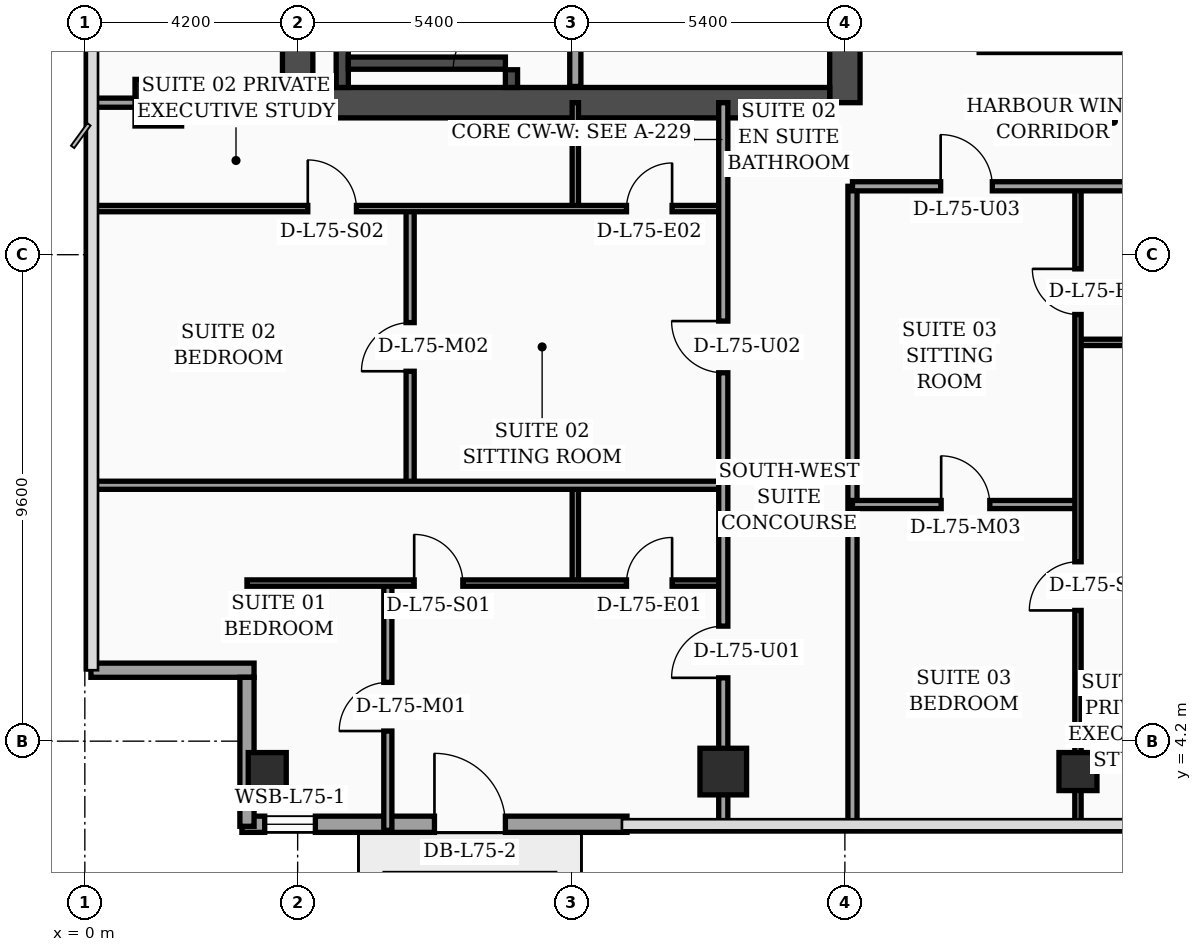
"""IFC4 building model, lengths in metres.
Left out: names, types, materials, properties, quantities, classifications, styles, units other than length and angle.
Written with IfcOpenShell. Run it as: python <this file> out.ifc"""

import sys

from ifc_helpers import new_model, si_unit, direction, frame, frame_2d, origin, origin_2d, place, context, subcontext, project, spatial, rectangle, hollow_rectangle, extrude, element, fill, save


model = new_model("IFC4")
c1 = context("Model", 3, precision=1e-05, world=origin(), true_north=direction((0.0, 1.0)))
c2 = subcontext(c1, "Body", "Model", "MODEL_VIEW")
j1 = project(units=[si_unit("LENGTHUNIT", "METRE"), si_unit("PLANEANGLEUNIT", "RADIAN")], contexts=[c1])
p1 = place(None, origin())
s1 = spatial("IfcSite", under=j1, at=p1, CompositionType="ELEMENT")
p2 = place(p1, origin())
s2 = spatial("IfcBuilding", under=s1, at=p2, CompositionType="ELEMENT")
p3 = place(p2, frame((0.0, 0.0, 302.5)))
s3 = spatial("IfcBuildingStorey", under=s2, at=p3, CompositionType="ELEMENT", Elevation=302.5)
p4 = place(p3, frame((4.2, 16.8, 0.0), z_axis=(0.0, 0.0, 1.0), x_axis=(0.0, 1.0, 0.0)))
e1 = element("IfcWall", 1, at=p4, inside=s3, PredefinedType="SHEAR", context=c2, shape_type="SweptSolid", body=[
    extrude(rectangle(XDim=21.6, YDim=0.6, at=frame_2d((10.8, 0.0))), origin(), (0.0, 0.0, 1.0), 4.05),
])
p5 = place(p3, frame((15.0, 16.8, 0.0), z_axis=(0.0, 0.0, 1.0), x_axis=(0.0, 1.0, 0.0)))
e2 = element("IfcWall", 2, at=p5, inside=s3, PredefinedType="SHEAR", context=c2, shape_type="SweptSolid", body=[
    extrude(rectangle(XDim=21.6, YDim=0.6, at=frame_2d((10.8, 0.0))), origin(), (0.0, 0.0, 1.0), 4.05),
])
p6 = place(p5, frame((8.65, 0.0, 0.0)))
e3 = element("IfcOpeningElement", 3, at=p6, cuts=e2, PredefinedType="OPENING", context=c2, shape_type="SweptSolid", body=[
    extrude(rectangle(XDim=1.1, YDim=2.2, at=frame_2d((0.55, 1.1))), frame((0.0, 0.31, 0.0), z_axis=(0.0, -1.0, 0.0), x_axis=(1.0, 0.0, 0.0)), (0.0, 0.0, 1.0), 0.62),
])
p7 = place(p5, frame((18.9, 0.0, 0.0)))
e4 = element("IfcOpeningElement", 4, at=p7, cuts=e2, PredefinedType="OPENING", context=c2, shape_type="SweptSolid", body=[
    extrude(rectangle(XDim=1.1, YDim=2.2, at=frame_2d((0.55, 1.1))), frame((0.0, 0.31, 0.0), z_axis=(0.0, -1.0, 0.0), x_axis=(1.0, 0.0, 0.0)), (0.0, 0.0, 1.0), 0.62),
])
p8 = place(p3, frame((4.5, 16.8, 0.0), z_axis=(0.0, 0.0, 1.0), x_axis=(1.0, 0.0, 0.0)))
e5 = element("IfcWall", 5, at=p8, inside=s3, PredefinedType="SHEAR", context=c2, shape_type="SweptSolid", body=[
    extrude(rectangle(XDim=10.2, YDim=0.6, at=frame_2d((5.1, 0.0))), origin(), (0.0, 0.0, 1.0), 4.05),
])
p9 = place(p3, frame((5.08, 17.1, 0.0), z_axis=(0.0, 0.0, 1.0), x_axis=(0.0, 1.0, 0.0)))
e6 = element("IfcWall", 6, at=p9, inside=s3, PredefinedType="SOLIDWALL", context=c2, shape_type="SweptSolid", body=[
    extrude(rectangle(XDim=9.69, YDim=0.24, at=frame_2d((4.845, 0.0))), origin(), (0.0, 0.0, 1.0), 4.05),
])
p10 = place(p3, frame((8.42, 17.1, 0.0), z_axis=(0.0, 0.0, 1.0), x_axis=(0.0, 1.0, 0.0)))
e7 = element("IfcWall", 7, at=p10, inside=s3, PredefinedType="SOLIDWALL", context=c2, shape_type="SweptSolid", body=[
    extrude(rectangle(XDim=9.69, YDim=0.24, at=frame_2d((4.845, 0.0))), origin(), (0.0, 0.0, 1.0), 4.05),
])
p11 = place(p10, frame((0.35, 0.0, 0.0)))
e8 = element("IfcOpeningElement", 8, at=p11, cuts=e7, PredefinedType="OPENING", context=c2, shape_type="SweptSolid", body=[
    extrude(rectangle(XDim=1.15, YDim=2.2, at=frame_2d((0.575, 1.1))), frame((0.0, 0.13, 0.0), z_axis=(0.0, -1.0, 0.0), x_axis=(1.0, 0.0, 0.0)), (0.0, 0.0, 1.0), 0.26),
])
p12 = place(p3, frame((5.2, 17.58, 0.0), z_axis=(0.0, 0.0, 1.0), x_axis=(1.0, 0.0, 0.0)))
e9 = element("IfcWall", 9, at=p12, inside=s3, PredefinedType="SOLIDWALL", context=c2, shape_type="SweptSolid", body=[
    extrude(rectangle(XDim=3.1, YDim=0.24, at=frame_2d((1.55, 0.0))), origin(), (0.0, 0.0, 1.0), 4.05),
])
p13 = place(p3, frame((3.6, 3.6, 0.0), z_axis=(0.0, 0.0, 1.0), x_axis=(1.0, 0.0, 0.0)))
e10 = element("IfcColumn", 10, at=p13, inside=s3, PredefinedType="COLUMN", context=c2, shape_type="SweptSolid", body=[
    extrude(hollow_rectangle(XDim=0.75, YDim=0.75, WallThickness=0.032, at=origin_2d()), origin(), (0.0, 0.0, 1.0), 4.05),
])
for number, where, z_axis, x_axis in (
    (11, (1.45, 16.8, 0.0), (0.0, 0.0, 1.0), (1.0, 0.0, 0.0)),
    (12, (12.6, 3.6, 0.0), (0.0, 0.0, 1.0), (1.0, 0.0, 0.0)),
):
    element("IfcColumn", number, at=place(p3, frame(where, z_axis=z_axis, x_axis=x_axis)), inside=s3, PredefinedType="COLUMN", context=c2, shape_type="SweptSolid", body=[
        extrude(rectangle(XDim=0.92, YDim=0.92, at=origin_2d()), origin(), (0.0, 0.0, 1.0), 4.05),
    ])
p14 = place(p3, frame((19.6, 3.6, 0.0), z_axis=(0.0, 0.0, 1.0), x_axis=(1.0, 0.0, 0.0)))
e13 = element("IfcColumn", 13, at=p14, inside=s3, PredefinedType="COLUMN", context=c2, shape_type="SweptSolid", body=[
    extrude(hollow_rectangle(XDim=0.75, YDim=0.75, WallThickness=0.032, at=origin_2d()), origin(), (0.0, 0.0, 1.0), 4.05),
])
p15 = place(p3, frame((3.1, 2.56, 0.0), z_axis=(0.0, 0.0, 1.0), x_axis=(1.0, 0.0, 0.0)))
e14 = element("IfcWall", 14, at=p15, inside=s3, PredefinedType="SOLIDWALL", context=c2, shape_type="SweptSolid", body=[
    extrude(rectangle(XDim=7.6, YDim=0.32, at=frame_2d((3.8, 0.0))), origin(), (0.0, 0.0, 1.0), 4.05),
])
p16 = place(p15, frame((0.45, 0.0, 0.75)))
e15 = element("IfcOpeningElement", 15, at=p16, cuts=e14, PredefinedType="OPENING", context=c2, shape_type="SweptSolid", body=[
    extrude(rectangle(XDim=1.0, YDim=1.6, at=frame_2d((0.5, 0.8))), frame((0.0, 0.17, 0.0), z_axis=(0.0, -1.0, 0.0), x_axis=(1.0, 0.0, 0.0)), (0.0, 0.0, 1.0), 0.34),
])
p17 = place(p15, frame((3.8, 0.0, 0.0)))
e16 = element("IfcOpeningElement", 16, at=p17, cuts=e14, PredefinedType="OPENING", context=c2, shape_type="SweptSolid", body=[
    extrude(rectangle(XDim=1.4, YDim=2.25, at=frame_2d((0.7, 1.125))), frame((0.0, 0.17, 0.0), z_axis=(0.0, -1.0, 0.0), x_axis=(1.0, 0.0, 0.0)), (0.0, 0.0, 1.0), 0.34),
])
p18 = place(p3, frame((0.12, 5.6, 0.0), z_axis=(0.0, 0.0, 1.0), x_axis=(1.0, 0.0, 0.0)))
e17 = element("IfcWall", 17, at=p18, inside=s3, PredefinedType="SOLIDWALL", context=c2, shape_type="SweptSolid", body=[
    extrude(rectangle(XDim=3.22, YDim=0.28, at=frame_2d((1.61, 0.0))), origin(), (0.0, 0.0, 1.0), 3.5),
])
p19 = place(p3, frame((3.2, 5.46, 0.0), z_axis=(0.0, 0.0, 1.0), x_axis=(0.0, -1.0, 0.0)))
e18 = element("IfcWall", 18, at=p19, inside=s3, PredefinedType="SOLIDWALL", context=c2, shape_type="SweptSolid", body=[
    extrude(rectangle(XDim=2.94, YDim=0.28, at=frame_2d((1.47, 0.0))), origin(), (0.0, 0.0, 1.0), 2.35),
])
p20 = place(p3, frame((9.68, 17.12, 0.0), z_axis=(0.0, 0.0, 1.0), x_axis=(0.0, 1.0, 0.0)))
e19 = element("IfcWall", 19, at=p20, inside=s3, PredefinedType="SOLIDWALL", context=c2, shape_type="SweptSolid", body=[
    extrude(rectangle(XDim=7.88, YDim=0.22, at=frame_2d((3.94, 0.0))), origin(), (0.0, 0.0, 1.0), 4.05),
])
p21 = place(p3, frame((0.08, 16.8, 0.0), z_axis=(0.0, 0.0, 1.0), x_axis=(1.0, 0.0, 0.0)))
e20 = element("IfcWall", 20, at=p21, inside=s3, PredefinedType="PARTITIONING", context=c2, shape_type="SweptSolid", body=[
    extrude(rectangle(XDim=3.85, YDim=0.18, at=frame_2d((1.925, 0.0))), origin(), (0.0, 0.0, 1.0), 3.5),
])
p22 = place(p3, frame((9.68, 7.32, 0.0), z_axis=(0.0, 0.0, 1.0), x_axis=(0.0, 1.0, 0.0)))
e21 = element("IfcWall", 21, at=p22, inside=s3, PredefinedType="PARTITIONING", context=c2, shape_type="SweptSolid", body=[
    extrude(rectangle(XDim=1.93, YDim=0.125, at=frame_2d((0.965, 0.0))), origin(), (0.0, 0.0, 1.0), 4.05),
])
p23 = place(p3, frame((5.98, 2.44, 0.0), z_axis=(0.0, 0.0, 1.0), x_axis=(0.0, 1.0, 0.0)))
e22 = element("IfcWall", 22, at=p23, inside=s3, PredefinedType="PARTITIONING", context=c2, shape_type="SweptSolid", body=[
    extrude(rectangle(XDim=4.88, YDim=0.16, at=frame_2d((2.44, 0.0))), origin(), (0.0, 0.0, 1.0), 2.35),
])
p24 = place(p23, frame((1.96, 0.0, 0.0)))
e23 = element("IfcOpeningElement", 23, at=p24, cuts=e22, PredefinedType="OPENING", context=c2, shape_type="SweptSolid", body=[
    extrude(rectangle(XDim=0.96, YDim=2.2, at=frame_2d((0.48, 1.1))), frame((0.0, 0.09, 0.0), z_axis=(0.0, -1.0, 0.0), x_axis=(1.0, 0.0, 0.0)), (0.0, 0.0, 1.0), 0.18),
])
p25 = place(p3, frame((3.2, 7.32, 0.0), z_axis=(0.0, 0.0, 1.0), x_axis=(1.0, 0.0, 0.0)))
e24 = element("IfcWall", 24, at=p25, inside=s3, PredefinedType="PARTITIONING", context=c2, shape_type="SweptSolid", body=[
    extrude(rectangle(XDim=9.4, YDim=0.125, at=frame_2d((4.7, 0.0))), origin(), (0.0, 0.0, 1.0), 3.5),
])
p26 = place(p25, frame((3.3, 0.0, 0.0)))
e25 = element("IfcOpeningElement", 25, at=p26, cuts=e24, PredefinedType="OPENING", context=c2, shape_type="SweptSolid", body=[
    extrude(rectangle(XDim=0.96, YDim=2.2, at=frame_2d((0.48, 1.1))), frame((0.0, 0.073, 0.0), z_axis=(0.0, -1.0, 0.0), x_axis=(1.0, 0.0, 0.0)), (0.0, 0.0, 1.0), 0.145),
])
p27 = place(p25, frame((7.49, 0.0, 0.0)))
e26 = element("IfcOpeningElement", 26, at=p27, cuts=e24, PredefinedType="OPENING", context=c2, shape_type="SweptSolid", body=[
    extrude(rectangle(XDim=0.9, YDim=2.15, at=frame_2d((0.45, 1.075))), frame((0.0, 0.073, 0.0), z_axis=(0.0, -1.0, 0.0), x_axis=(1.0, 0.0, 0.0)), (0.0, 0.0, 1.0), 0.145),
])
p28 = place(p3, frame((9.68, 14.71, 0.0), z_axis=(0.0, 0.0, 1.0), x_axis=(0.0, 1.0, 0.0)))
e27 = element("IfcWall", 27, at=p28, inside=s3, PredefinedType="PARTITIONING", context=c2, shape_type="SweptSolid", body=[
    extrude(rectangle(XDim=2.09, YDim=0.125, at=frame_2d((1.045, 0.0))), origin(), (0.0, 0.0, 1.0), 4.05),
])
p29 = place(p3, frame((6.42, 9.25, 0.0), z_axis=(0.0, 0.0, 1.0), x_axis=(0.0, 1.0, 0.0)))
e28 = element("IfcWall", 28, at=p29, inside=s3, PredefinedType="PARTITIONING", context=c2, shape_type="SweptSolid", body=[
    extrude(rectangle(XDim=5.46, YDim=0.16, at=frame_2d((2.73, 0.0))), origin(), (0.0, 0.0, 1.0), 3.65),
])
p30 = place(p29, frame((2.25, 0.0, 0.0)))
e29 = element("IfcOpeningElement", 29, at=p30, cuts=e28, PredefinedType="OPENING", context=c2, shape_type="SweptSolid", body=[
    extrude(rectangle(XDim=0.96, YDim=2.2, at=frame_2d((0.48, 1.1))), frame((0.0, 0.09, 0.0), z_axis=(0.0, -1.0, 0.0), x_axis=(1.0, 0.0, 0.0)), (0.0, 0.0, 1.0), 0.18),
])
p31 = place(p3, frame((0.08, 14.71, 0.0), z_axis=(0.0, 0.0, 1.0), x_axis=(1.0, 0.0, 0.0)))
e30 = element("IfcWall", 30, at=p31, inside=s3, PredefinedType="PARTITIONING", context=c2, shape_type="SweptSolid", body=[
    extrude(rectangle(XDim=12.52, YDim=0.125, at=frame_2d((6.26, 0.0))), origin(), (0.0, 0.0, 1.0), 3.5),
])
p32 = place(p31, frame((4.32, 0.0, 0.0)))
e31 = element("IfcOpeningElement", 31, at=p32, cuts=e30, PredefinedType="OPENING", context=c2, shape_type="SweptSolid", body=[
    extrude(rectangle(XDim=0.96, YDim=2.2, at=frame_2d((0.48, 1.1))), frame((0.0, 0.073, 0.0), z_axis=(0.0, -1.0, 0.0), x_axis=(1.0, 0.0, 0.0)), (0.0, 0.0, 1.0), 0.145),
])
p33 = place(p31, frame((10.61, 0.0, 0.0)))
e32 = element("IfcOpeningElement", 32, at=p33, cuts=e30, PredefinedType="OPENING", context=c2, shape_type="SweptSolid", body=[
    extrude(rectangle(XDim=0.9, YDim=2.15, at=frame_2d((0.45, 1.075))), frame((0.0, 0.073, 0.0), z_axis=(0.0, -1.0, 0.0), x_axis=(1.0, 0.0, 0.0)), (0.0, 0.0, 1.0), 0.145),
])
p34 = place(p3, frame((0.08, 9.25, 0.0), z_axis=(0.0, 0.0, 1.0), x_axis=(1.0, 0.0, 0.0)))
e33 = element("IfcWall", 33, at=p34, inside=s3, PredefinedType="PARTITIONING", context=c2, shape_type="SweptSolid", body=[
    extrude(rectangle(XDim=12.52, YDim=0.16, at=frame_2d((6.26, 0.0))), origin(), (0.0, 0.0, 1.0), 3.5),
])
p35 = place(p3, frame((12.6, 2.44, 0.0), z_axis=(0.0, 0.0, 1.0), x_axis=(0.0, 1.0, 0.0)))
e34 = element("IfcWall", 34, at=p35, inside=s3, PredefinedType="PARTITIONING", context=c2, shape_type="SweptSolid", body=[
    extrude(rectangle(XDim=14.36, YDim=0.18, at=frame_2d((7.18, 0.0))), origin(), (0.0, 0.0, 1.0), 2.35),
])
p36 = place(p35, frame((3.01, 0.0, 0.0)))
e35 = element("IfcOpeningElement", 35, at=p36, cuts=e34, PredefinedType="OPENING", context=c2, shape_type="SweptSolid", body=[
    extrude(rectangle(XDim=1.02, YDim=2.2, at=frame_2d((0.51, 1.1))), frame((0.0, 0.1, 0.0), z_axis=(0.0, -1.0, 0.0), x_axis=(1.0, 0.0, 0.0)), (0.0, 0.0, 1.0), 0.2),
])
p37 = place(p35, frame((9.03, 0.0, 0.0)))
e36 = element("IfcOpeningElement", 36, at=p37, cuts=e34, PredefinedType="OPENING", context=c2, shape_type="SweptSolid", body=[
    extrude(rectangle(XDim=1.02, YDim=2.2, at=frame_2d((0.51, 1.1))), frame((0.0, 0.1, 0.0), z_axis=(0.0, -1.0, 0.0), x_axis=(1.0, 0.0, 0.0)), (0.0, 0.0, 1.0), 0.2),
])
p38 = place(p3, frame((15.15, 2.44, 0.0), z_axis=(0.0, 0.0, 1.0), x_axis=(0.0, 1.0, 0.0)))
e37 = element("IfcWall", 37, at=p38, inside=s3, PredefinedType="PARTITIONING", context=c2, shape_type="SweptSolid", body=[
    extrude(rectangle(XDim=12.71, YDim=0.18, at=frame_2d((6.355, 0.0))), origin(), (0.0, 0.0, 1.0), 2.35),
])
p39 = place(p3, frame((19.6, 12.07, 0.0), z_axis=(0.0, 0.0, 1.0), x_axis=(1.0, 0.0, 0.0)))
e38 = element("IfcWall", 38, at=p39, inside=s3, PredefinedType="PARTITIONING", context=c2, shape_type="SweptSolid", body=[
    extrude(rectangle(XDim=2.0, YDim=0.125, at=frame_2d((1.0, 0.0))), origin(), (0.0, 0.0, 1.0), 4.05),
])
p40 = place(p3, frame((15.15, 8.87, 0.0), z_axis=(0.0, 0.0, 1.0), x_axis=(1.0, 0.0, 0.0)))
e39 = element("IfcWall", 39, at=p40, inside=s3, PredefinedType="PARTITIONING", context=c2, shape_type="SweptSolid", body=[
    extrude(rectangle(XDim=4.45, YDim=0.16, at=frame_2d((2.225, 0.0))), origin(), (0.0, 0.0, 1.0), 4.05),
])
p41 = place(p40, frame((1.75, 0.0, 0.0)))
e40 = element("IfcOpeningElement", 40, at=p41, cuts=e39, PredefinedType="OPENING", context=c2, shape_type="SweptSolid", body=[
    extrude(rectangle(XDim=0.96, YDim=2.2, at=frame_2d((0.48, 1.1))), frame((0.0, 0.09, 0.0), z_axis=(0.0, -1.0, 0.0), x_axis=(1.0, 0.0, 0.0)), (0.0, 0.0, 1.0), 0.18),
])
p42 = place(p3, frame((19.6, 2.44, 0.0), z_axis=(0.0, 0.0, 1.0), x_axis=(0.0, 1.0, 0.0)))
e41 = element("IfcWall", 41, at=p42, inside=s3, PredefinedType="PARTITIONING", context=c2, shape_type="SweptSolid", body=[
    extrude(rectangle(XDim=12.71, YDim=0.125, at=frame_2d((6.355, 0.0))), origin(), (0.0, 0.0, 1.0), 2.35),
])
p43 = place(p42, frame((4.34, 0.0, 0.0)))
e42 = element("IfcOpeningElement", 42, at=p43, cuts=e41, PredefinedType="OPENING", context=c2, shape_type="SweptSolid", body=[
    extrude(rectangle(XDim=0.96, YDim=2.2, at=frame_2d((0.48, 1.1))), frame((0.0, 0.073, 0.0), z_axis=(0.0, -1.0, 0.0), x_axis=(1.0, 0.0, 0.0)), (0.0, 0.0, 1.0), 0.145),
])
p44 = place(p42, frame((10.18, 0.0, 0.0)))
e43 = element("IfcOpeningElement", 43, at=p44, cuts=e41, PredefinedType="OPENING", context=c2, shape_type="SweptSolid", body=[
    extrude(rectangle(XDim=0.9, YDim=2.15, at=frame_2d((0.45, 1.075))), frame((0.0, 0.073, 0.0), z_axis=(0.0, -1.0, 0.0), x_axis=(1.0, 0.0, 0.0)), (0.0, 0.0, 1.0), 0.145),
])
p45 = place(p3, frame((15.15, 15.15, 0.0), z_axis=(0.0, 0.0, 1.0), x_axis=(1.0, 0.0, 0.0)))
e44 = element("IfcWall", 44, at=p45, inside=s3, PredefinedType="PARTITIONING", context=c2, shape_type="SweptSolid", body=[
    extrude(rectangle(XDim=6.45, YDim=0.18, at=frame_2d((3.225, 0.0))), origin(), (0.0, 0.0, 1.0), 3.1),
])
p46 = place(p45, frame((1.74, 0.0, 0.0)))
e45 = element("IfcOpeningElement", 45, at=p46, cuts=e44, PredefinedType="OPENING", context=c2, shape_type="SweptSolid", body=[
    extrude(rectangle(XDim=1.02, YDim=2.2, at=frame_2d((0.51, 1.1))), frame((0.0, 0.1, 0.0), z_axis=(0.0, -1.0, 0.0), x_axis=(1.0, 0.0, 0.0)), (0.0, 0.0, 1.0), 0.2),
])
p47 = place(p3, frame((17.65, 17.88, 0.0), z_axis=(0.0, 0.0, 1.0), x_axis=(1.0, 0.0, 0.0)))
e46 = element("IfcWall", 46, at=p47, inside=s3, PredefinedType="PARTITIONING", context=c2, shape_type="SweptSolid", body=[
    extrude(rectangle(XDim=3.9, YDim=0.18, at=frame_2d((1.95, 0.0))), origin(), (0.0, 0.0, 1.0), 4.05),
])
p48 = place(p16, origin())
e47 = element("IfcWindow", 47, at=p48, inside=s3, PartitioningType="SINGLE_PANEL", PredefinedType="WINDOW", context=c2, shape_type="SweptSolid", body=[
    extrude(rectangle(XDim=1.0, YDim=1.6, at=frame_2d((0.5, 0.8))), frame((0.0, 0.03, 0.0), z_axis=(0.0, -1.0, 0.0), x_axis=(1.0, 0.0, 0.0)), (0.0, 0.0, 1.0), 0.06),
])
fill(e15, e47)
p49 = place(p17, origin())
e48 = element("IfcDoor", 48, at=p49, inside=s3, OperationType="SINGLE_SWING_LEFT", PredefinedType="DOOR", context=c2, shape_type="SweptSolid", body=[
    extrude(rectangle(XDim=1.4, YDim=2.25, at=frame_2d((0.7, 1.125))), frame((0.0, 0.025, 0.0), z_axis=(0.0, -1.0, 0.0), x_axis=(1.0, 0.0, 0.0)), (0.0, 0.0, 1.0), 0.05),
])
fill(e16, e48)
p50 = place(p24, origin())
e49 = element("IfcDoor", 49, at=p50, inside=s3, OperationType="SINGLE_SWING_LEFT", PredefinedType="DOOR", context=c2, shape_type="SweptSolid", body=[
    extrude(rectangle(XDim=0.96, YDim=2.2, at=frame_2d((0.48, 1.1))), frame((0.0, 0.025, 0.0), z_axis=(0.0, -1.0, 0.0), x_axis=(1.0, 0.0, 0.0)), (0.0, 0.0, 1.0), 0.05),
])
fill(e23, e49)
p51 = place(p26, origin())
e50 = element("IfcDoor", 50, at=p51, inside=s3, OperationType="SINGLE_SWING_LEFT", PredefinedType="DOOR", context=c2, shape_type="SweptSolid", body=[
    extrude(rectangle(XDim=0.96, YDim=2.2, at=frame_2d((0.48, 1.1))), frame((0.0, 0.025, 0.0), z_axis=(0.0, -1.0, 0.0), x_axis=(1.0, 0.0, 0.0)), (0.0, 0.0, 1.0), 0.05),
])
fill(e25, e50)
p52 = place(p27, origin())
e51 = element("IfcDoor", 51, at=p52, inside=s3, OperationType="SINGLE_SWING_RIGHT", PredefinedType="DOOR", context=c2, shape_type="SweptSolid", body=[
    extrude(rectangle(XDim=0.9, YDim=2.15, at=frame_2d((0.45, 1.075))), frame((0.0, 0.025, 0.0), z_axis=(0.0, -1.0, 0.0), x_axis=(1.0, 0.0, 0.0)), (0.0, 0.0, 1.0), 0.05),
])
fill(e26, e51)
p53 = place(p30, origin())
e52 = element("IfcDoor", 52, at=p53, inside=s3, OperationType="SINGLE_SWING_LEFT", PredefinedType="DOOR", context=c2, shape_type="SweptSolid", body=[
    extrude(rectangle(XDim=0.96, YDim=2.2, at=frame_2d((0.48, 1.1))), frame((0.0, 0.025, 0.0), z_axis=(0.0, -1.0, 0.0), x_axis=(1.0, 0.0, 0.0)), (0.0, 0.0, 1.0), 0.05),
])
fill(e29, e52)
p54 = place(p32, origin())
e53 = element("IfcDoor", 53, at=p54, inside=s3, OperationType="SINGLE_SWING_LEFT", PredefinedType="DOOR", context=c2, shape_type="SweptSolid", body=[
    extrude(rectangle(XDim=0.96, YDim=2.2, at=frame_2d((0.48, 1.1))), frame((0.0, 0.025, 0.0), z_axis=(0.0, -1.0, 0.0), x_axis=(1.0, 0.0, 0.0)), (0.0, 0.0, 1.0), 0.05),
])
fill(e31, e53)
p55 = place(p33, origin())
e54 = element("IfcDoor", 54, at=p55, inside=s3, OperationType="SINGLE_SWING_RIGHT", PredefinedType="DOOR", context=c2, shape_type="SweptSolid", body=[
    extrude(rectangle(XDim=0.9, YDim=2.15, at=frame_2d((0.45, 1.075))), frame((0.0, 0.025, 0.0), z_axis=(0.0, -1.0, 0.0), x_axis=(1.0, 0.0, 0.0)), (0.0, 0.0, 1.0), 0.05),
])
fill(e32, e54)
p56 = place(p36, origin())
e55 = element("IfcDoor", 55, at=p56, inside=s3, OperationType="SINGLE_SWING_LEFT", PredefinedType="DOOR", context=c2, shape_type="SweptSolid", body=[
    extrude(rectangle(XDim=1.02, YDim=2.2, at=frame_2d((0.51, 1.1))), frame((0.0, 0.025, 0.0), z_axis=(0.0, -1.0, 0.0), x_axis=(1.0, 0.0, 0.0)), (0.0, 0.0, 1.0), 0.05),
])
fill(e35, e55)
p57 = place(p37, origin())
e56 = element("IfcDoor", 56, at=p57, inside=s3, OperationType="SINGLE_SWING_RIGHT", PredefinedType="DOOR", context=c2, shape_type="SweptSolid", body=[
    extrude(rectangle(XDim=1.02, YDim=2.2, at=frame_2d((0.51, 1.1))), frame((0.0, 0.025, 0.0), z_axis=(0.0, -1.0, 0.0), x_axis=(1.0, 0.0, 0.0)), (0.0, 0.0, 1.0), 0.05),
])
fill(e36, e56)
p58 = place(p41, origin())
e57 = element("IfcDoor", 57, at=p58, inside=s3, OperationType="SINGLE_SWING_LEFT", PredefinedType="DOOR", context=c2, shape_type="SweptSolid", body=[
    extrude(rectangle(XDim=0.96, YDim=2.2, at=frame_2d((0.48, 1.1))), frame((0.0, 0.025, 0.0), z_axis=(0.0, -1.0, 0.0), x_axis=(1.0, 0.0, 0.0)), (0.0, 0.0, 1.0), 0.05),
])
fill(e40, e57)
p59 = place(p43, origin())
e58 = element("IfcDoor", 58, at=p59, inside=s3, OperationType="SINGLE_SWING_LEFT", PredefinedType="DOOR", context=c2, shape_type="SweptSolid", body=[
    extrude(rectangle(XDim=0.96, YDim=2.2, at=frame_2d((0.48, 1.1))), frame((0.0, 0.025, 0.0), z_axis=(0.0, -1.0, 0.0), x_axis=(1.0, 0.0, 0.0)), (0.0, 0.0, 1.0), 0.05),
])
fill(e42, e58)
p60 = place(p44, origin())
e59 = element("IfcDoor", 59, at=p60, inside=s3, OperationType="SINGLE_SWING_RIGHT", PredefinedType="DOOR", context=c2, shape_type="SweptSolid", body=[
    extrude(rectangle(XDim=0.9, YDim=2.15, at=frame_2d((0.45, 1.075))), frame((0.0, 0.025, 0.0), z_axis=(0.0, -1.0, 0.0), x_axis=(1.0, 0.0, 0.0)), (0.0, 0.0, 1.0), 0.05),
])
fill(e43, e59)
p61 = place(p46, origin())
e60 = element("IfcDoor", 60, at=p61, inside=s3, OperationType="SINGLE_SWING_LEFT", PredefinedType="DOOR", context=c2, shape_type="SweptSolid", body=[
    extrude(rectangle(XDim=1.02, YDim=2.2, at=frame_2d((0.51, 1.1))), frame((0.0, 0.025, 0.0), z_axis=(0.0, -1.0, 0.0), x_axis=(1.0, 0.0, 0.0)), (0.0, 0.0, 1.0), 0.05),
])
fill(e45, e60)
p62 = place(p11, origin())
e61 = element("IfcDoor", 61, at=p62, inside=s3, OperationType="SINGLE_SWING_LEFT", PredefinedType="DOOR", context=c2, shape_type="SweptSolid", body=[
    extrude(rectangle(XDim=1.15, YDim=2.2, at=frame_2d((0.575, 1.1))), frame((0.0, 0.025, 0.0), z_axis=(0.0, -1.0, 0.0), x_axis=(1.0, 0.0, 0.0)), (0.0, 0.0, 1.0), 0.05),
])
fill(e8, e61)
save(model, sys.argv[1])
